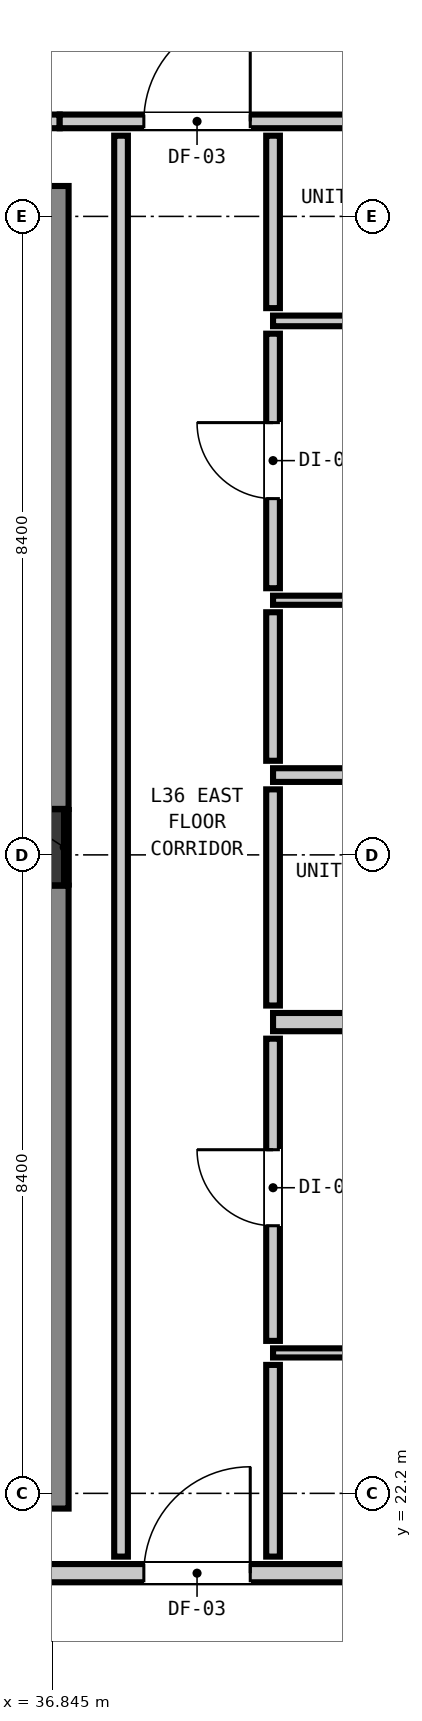
"""IFC4 building model, lengths in metres.
Left out: names, types, materials, properties, quantities, classifications, styles, units other than length and angle.
Written with IfcOpenShell. Run it as: python <this file> out.ifc"""

import sys

from ifc_helpers import new_model, si_unit, direction, frame, frame_2d, origin, origin_2d, place, context, subcontext, project, spatial, rectangle, extrude, element, fill, save


model = new_model("IFC4")
c1 = context("Model", 3, precision=1e-05, world=origin(), true_north=direction((0.0, 1.0)))
c2 = subcontext(c1, "Body", "Model", "MODEL_VIEW")
j1 = project(units=[si_unit("LENGTHUNIT", "METRE"), si_unit("PLANEANGLEUNIT", "RADIAN")], contexts=[c1])
p1 = place(None, origin())
s1 = spatial("IfcSite", under=j1, at=p1, CompositionType="ELEMENT")
p2 = place(p1, origin())
s2 = spatial("IfcBuilding", under=s1, at=p2, CompositionType="ELEMENT")
p3 = place(p2, frame((0.0, 0.0, 126.0)))
s3 = spatial("IfcBuildingStorey", under=s2, at=p3, CompositionType="ELEMENT", Elevation=126.0)
p4 = place(p3, frame((36.5, 30.7, 0.0), z_axis=(0.0, 0.0, 1.0), x_axis=(1.0, 0.0, 0.0)))
e1 = element("IfcColumn", 1, at=p4, inside=s3, PredefinedType="COLUMN", context=c2, shape_type="SweptSolid", body=[
    extrude(rectangle(XDim=1.0, YDim=1.0, at=origin_2d()), origin(), (0.0, 0.0, 1.0), 3.32),
])
p5 = place(p3, frame((36.56, 22.0, 0.0), z_axis=(0.0, 0.0, 1.0), x_axis=(0.0, 1.0, 0.0)))
e2 = element("IfcWall", 2, at=p5, inside=s3, PredefinedType="SHEAR", context=c2, shape_type="SweptSolid", body=[
    extrude(rectangle(XDim=8.195, YDim=1.0, at=frame_2d((4.098, 0.0))), origin(), (0.0, 0.0, 1.0), 3.32),
])
p6 = place(p3, frame((36.56, 31.205, 0.0), z_axis=(0.0, 0.0, 1.0), x_axis=(0.0, 1.0, 0.0)))
e3 = element("IfcWall", 3, at=p6, inside=s3, PredefinedType="SHEAR", context=c2, shape_type="SweptSolid", body=[
    extrude(rectangle(XDim=8.195, YDim=1.0, at=frame_2d((4.097, 0.0))), origin(), (0.0, 0.0, 1.0), 3.32),
])
p7 = place(p3, frame((9.407, 21.15, 0.0), z_axis=(0.0, 0.0, 1.0), x_axis=(1.0, 0.0, 0.0)))
e4 = element("IfcWall", 4, at=p7, inside=s3, PredefinedType="PARTITIONING", context=c2, shape_type="SweptSolid", body=[
    extrude(rectangle(XDim=39.386, YDim=0.24, at=frame_2d((19.693, 0.0))), origin(), (0.0, 0.0, 1.0), 3.08),
])
p8 = place(p7, frame((8.803, 0.0, 0.0)))
e5 = element("IfcOpeningElement", 5, at=p8, cuts=e4, PredefinedType="OPENING", context=c2, shape_type="SweptSolid", body=[
    extrude(rectangle(XDim=1.1, YDim=2.15, at=frame_2d((0.55, 1.075))), frame((0.0, 0.13, 0.0), z_axis=(0.0, -1.0, 0.0), x_axis=(1.0, 0.0, 0.0)), (0.0, 0.0, 1.0), 0.26),
])
p9 = place(p7, frame((1.192, 0.0, 0.0)))
e6 = element("IfcOpeningElement", 6, at=p9, cuts=e4, PredefinedType="OPENING", context=c2, shape_type="SweptSolid", body=[
    extrude(rectangle(XDim=1.4, YDim=2.15, at=frame_2d((0.7, 1.075))), frame((0.0, 0.13, 0.0), z_axis=(0.0, -1.0, 0.0), x_axis=(1.0, 0.0, 0.0)), (0.0, 0.0, 1.0), 0.26),
])
p10 = place(p7, frame((28.643, 0.0, 0.0)))
e7 = element("IfcOpeningElement", 7, at=p10, cuts=e4, PredefinedType="OPENING", context=c2, shape_type="SweptSolid", body=[
    extrude(rectangle(XDim=1.4, YDim=2.15, at=frame_2d((0.7, 1.075))), frame((0.0, 0.13, 0.0), z_axis=(0.0, -1.0, 0.0), x_axis=(1.0, 0.0, 0.0)), (0.0, 0.0, 1.0), 0.26),
])
p11 = place(p3, frame((39.75, 28.4, 0.0), z_axis=(0.0, 0.0, 1.0), x_axis=(1.0, 0.0, 0.0)))
e8 = element("IfcWall", 8, at=p11, inside=s3, PredefinedType="PARTITIONING", context=c2, shape_type="SweptSolid", body=[
    extrude(rectangle(XDim=9.043, YDim=0.24, at=frame_2d((4.521, 0.0))), origin(), (0.0, 0.0, 1.0), 3.08),
])
p12 = place(p11, frame((1.708, 0.0, 0.0)))
e9 = element("IfcOpeningElement", 9, at=p12, cuts=e8, PredefinedType="OPENING", context=c2, shape_type="SweptSolid", body=[
    extrude(rectangle(XDim=0.86, YDim=2.02, at=frame_2d((0.43, 1.01))), frame((0.0, 0.13, 0.0), z_axis=(0.0, -1.0, 0.0), x_axis=(1.0, 0.0, 0.0)), (0.0, 0.0, 1.0), 0.26),
])
p13 = place(p11, frame((6.187, 0.0, 0.0)))
e10 = element("IfcOpeningElement", 10, at=p13, cuts=e8, PredefinedType="OPENING", context=c2, shape_type="SweptSolid", body=[
    extrude(rectangle(XDim=0.9, YDim=2.1, at=frame_2d((0.45, 1.05))), frame((0.0, 0.13, 0.0), z_axis=(0.0, -1.0, 0.0), x_axis=(1.0, 0.0, 0.0)), (0.0, 0.0, 1.0), 0.26),
])
p14 = place(p3, frame((39.75, 31.65, 0.0), z_axis=(0.0, 0.0, 1.0), x_axis=(1.0, 0.0, 0.0)))
e11 = element("IfcWall", 11, at=p14, inside=s3, PredefinedType="PARTITIONING", context=c2, shape_type="SweptSolid", body=[
    extrude(rectangle(XDim=9.043, YDim=0.18, at=frame_2d((4.521, 0.0))), origin(), (0.0, 0.0, 1.0), 3.08),
])
p15 = place(p3, frame((9.407, 40.25, 0.0), z_axis=(0.0, 0.0, 1.0), x_axis=(1.0, 0.0, 0.0)))
e12 = element("IfcWall", 12, at=p15, inside=s3, PredefinedType="PARTITIONING", context=c2, shape_type="SweptSolid", body=[
    extrude(rectangle(XDim=27.536, YDim=0.18, at=frame_2d((13.768, 0.0))), origin(), (0.0, 0.0, 1.0), 3.08),
])
p16 = place(p15, frame((8.028, 0.0, 0.0)))
e13 = element("IfcOpeningElement", 13, at=p16, cuts=e12, PredefinedType="OPENING", context=c2, shape_type="SweptSolid", body=[
    extrude(rectangle(XDim=1.4, YDim=2.15, at=frame_2d((0.7, 1.075))), frame((0.0, 0.1, 0.0), z_axis=(0.0, -1.0, 0.0), x_axis=(1.0, 0.0, 0.0)), (0.0, 0.0, 1.0), 0.2),
])
p17 = place(p15, frame((1.192, 0.0, 0.0)))
e14 = element("IfcOpeningElement", 14, at=p17, cuts=e12, PredefinedType="OPENING", context=c2, shape_type="SweptSolid", body=[
    extrude(rectangle(XDim=1.4, YDim=2.15, at=frame_2d((0.7, 1.075))), frame((0.0, 0.1, 0.0), z_axis=(0.0, -1.0, 0.0), x_axis=(1.0, 0.0, 0.0)), (0.0, 0.0, 1.0), 0.2),
])
p18 = place(p3, frame((36.943, 40.25, 0.0), z_axis=(0.0, 0.0, 1.0), x_axis=(1.0, 0.0, 0.0)))
e15 = element("IfcWall", 15, at=p18, inside=s3, PredefinedType="PARTITIONING", context=c2, shape_type="SweptSolid", body=[
    extrude(rectangle(XDim=10.964, YDim=0.18, at=frame_2d((5.482, 0.0))), origin(), (0.0, 0.0, 1.0), 2.565),
])
p19 = place(p18, frame((1.107, 0.0, 0.0)))
e16 = element("IfcOpeningElement", 16, at=p19, cuts=e15, PredefinedType="OPENING", context=c2, shape_type="SweptSolid", body=[
    extrude(rectangle(XDim=1.4, YDim=2.15, at=frame_2d((0.7, 1.075))), frame((0.0, 0.1, 0.0), z_axis=(0.0, -1.0, 0.0), x_axis=(1.0, 0.0, 0.0)), (0.0, 0.0, 1.0), 0.2),
])
p20 = place(p3, frame((39.75, 37.625, 0.0), z_axis=(0.0, 0.0, 1.0), x_axis=(1.0, 0.0, 0.0)))
e17 = element("IfcWall", 17, at=p20, inside=s3, PredefinedType="PARTITIONING", context=c2, shape_type="SweptSolid", body=[
    extrude(rectangle(XDim=9.043, YDim=0.14, at=frame_2d((4.521, 0.0))), origin(), (0.0, 0.0, 1.0), 3.08),
])
p21 = place(p20, frame((1.708, 0.0, 0.0)))
e18 = element("IfcOpeningElement", 18, at=p21, cuts=e17, PredefinedType="OPENING", context=c2, shape_type="SweptSolid", body=[
    extrude(rectangle(XDim=0.86, YDim=2.02, at=frame_2d((0.43, 1.01))), frame((0.0, 0.08, 0.0), z_axis=(0.0, -1.0, 0.0), x_axis=(1.0, 0.0, 0.0)), (0.0, 0.0, 1.0), 0.16),
])
p22 = place(p20, frame((6.187, 0.0, 0.0)))
e19 = element("IfcOpeningElement", 19, at=p22, cuts=e17, PredefinedType="OPENING", context=c2, shape_type="SweptSolid", body=[
    extrude(rectangle(XDim=0.9, YDim=2.1, at=frame_2d((0.45, 1.05))), frame((0.0, 0.08, 0.0), z_axis=(0.0, -1.0, 0.0), x_axis=(1.0, 0.0, 0.0)), (0.0, 0.0, 1.0), 0.16),
])
p23 = place(p3, frame((39.75, 24.048, 0.0), z_axis=(0.0, 0.0, 1.0), x_axis=(1.0, 0.0, 0.0)))
e20 = element("IfcWall", 20, at=p23, inside=s3, PredefinedType="PARTITIONING", context=c2, shape_type="SweptSolid", body=[
    extrude(rectangle(XDim=9.043, YDim=0.12, at=frame_2d((4.521, 0.0))), origin(), (0.0, 0.0, 1.0), 3.08),
])
p24 = place(p23, frame((4.075, 0.0, 0.0)))
e21 = element("IfcOpeningElement", 21, at=p24, cuts=e20, PredefinedType="OPENING", context=c2, shape_type="SweptSolid", body=[
    extrude(rectangle(XDim=0.9, YDim=2.1, at=frame_2d((0.45, 1.05))), frame((0.0, 0.07, 0.0), z_axis=(0.0, -1.0, 0.0), x_axis=(1.0, 0.0, 0.0)), (0.0, 0.0, 1.0), 0.14),
])
p25 = place(p3, frame((39.75, 33.95, 0.0), z_axis=(0.0, 0.0, 1.0), x_axis=(1.0, 0.0, 0.0)))
e22 = element("IfcWall", 22, at=p25, inside=s3, PredefinedType="PARTITIONING", context=c2, shape_type="SweptSolid", body=[
    extrude(rectangle(XDim=9.043, YDim=0.12, at=frame_2d((4.521, 0.0))), origin(), (0.0, 0.0, 1.0), 3.08),
])
p26 = place(p25, frame((4.075, 0.0, 0.0)))
e23 = element("IfcOpeningElement", 23, at=p26, cuts=e22, PredefinedType="OPENING", context=c2, shape_type="SweptSolid", body=[
    extrude(rectangle(XDim=0.9, YDim=2.1, at=frame_2d((0.45, 1.05))), frame((0.0, 0.07, 0.0), z_axis=(0.0, -1.0, 0.0), x_axis=(1.0, 0.0, 0.0)), (0.0, 0.0, 1.0), 0.14),
])
p27 = place(p3, frame((37.75, 21.368, 0.0), z_axis=(0.0, 0.0, 1.0), x_axis=(0.0, 1.0, 0.0)))
e24 = element("IfcWall", 24, at=p27, inside=s3, PredefinedType="PARTITIONING", context=c2, shape_type="SweptSolid", body=[
    extrude(rectangle(XDim=18.694, YDim=0.18, at=frame_2d((9.347, 0.0))), origin(), (0.0, 0.0, 1.0), 3.08),
])
p28 = place(p3, frame((39.75, 21.368, 0.0), z_axis=(0.0, 0.0, 1.0), x_axis=(0.0, 1.0, 0.0)))
e25 = element("IfcWall", 25, at=p28, inside=s3, PredefinedType="PARTITIONING", context=c2, shape_type="SweptSolid", body=[
    extrude(rectangle(XDim=2.522, YDim=0.18, at=frame_2d((1.261, 0.0))), origin(), (0.0, 0.0, 1.0), 3.08),
])
p29 = place(p3, frame((39.75, 24.206, 0.0), z_axis=(0.0, 0.0, 1.0), x_axis=(0.0, 1.0, 0.0)))
e26 = element("IfcWall", 26, at=p29, inside=s3, PredefinedType="PARTITIONING", context=c2, shape_type="SweptSolid", body=[
    extrude(rectangle(XDim=3.976, YDim=0.18, at=frame_2d((1.988, 0.0))), origin(), (0.0, 0.0, 1.0), 3.08),
])
p30 = place(p29, frame((1.515, 0.0, 0.0)))
e27 = element("IfcOpeningElement", 27, at=p30, cuts=e26, PredefinedType="OPENING", context=c2, shape_type="SweptSolid", body=[
    extrude(rectangle(XDim=1.0, YDim=2.15, at=frame_2d((0.5, 1.075))), frame((0.0, 0.1, 0.0), z_axis=(0.0, -1.0, 0.0), x_axis=(1.0, 0.0, 0.0)), (0.0, 0.0, 1.0), 0.2),
])
p31 = place(p3, frame((39.75, 28.618, 0.0), z_axis=(0.0, 0.0, 1.0), x_axis=(0.0, 1.0, 0.0)))
e28 = element("IfcWall", 28, at=p31, inside=s3, PredefinedType="PARTITIONING", context=c2, shape_type="SweptSolid", body=[
    extrude(rectangle(XDim=2.844, YDim=0.18, at=frame_2d((1.422, 0.0))), origin(), (0.0, 0.0, 1.0), 3.08),
])
p32 = place(p3, frame((39.75, 31.838, 0.0), z_axis=(0.0, 0.0, 1.0), x_axis=(0.0, 1.0, 0.0)))
e29 = element("IfcWall", 29, at=p32, inside=s3, PredefinedType="PARTITIONING", context=c2, shape_type="SweptSolid", body=[
    extrude(rectangle(XDim=1.954, YDim=0.18, at=frame_2d((0.977, 0.0))), origin(), (0.0, 0.0, 1.0), 3.08),
])
p33 = place(p3, frame((39.75, 34.108, 0.0), z_axis=(0.0, 0.0, 1.0), x_axis=(0.0, 1.0, 0.0)))
e30 = element("IfcWall", 30, at=p33, inside=s3, PredefinedType="PARTITIONING", context=c2, shape_type="SweptSolid", body=[
    extrude(rectangle(XDim=3.349, YDim=0.18, at=frame_2d((1.675, 0.0))), origin(), (0.0, 0.0, 1.0), 3.08),
])
p34 = place(p33, frame((1.179, 0.0, 0.0)))
e31 = element("IfcOpeningElement", 31, at=p34, cuts=e30, PredefinedType="OPENING", context=c2, shape_type="SweptSolid", body=[
    extrude(rectangle(XDim=1.0, YDim=2.15, at=frame_2d((0.5, 1.075))), frame((0.0, 0.1, 0.0), z_axis=(0.0, -1.0, 0.0), x_axis=(1.0, 0.0, 0.0)), (0.0, 0.0, 1.0), 0.2),
])
p35 = place(p3, frame((39.75, 37.793, 0.0), z_axis=(0.0, 0.0, 1.0), x_axis=(0.0, 1.0, 0.0)))
e32 = element("IfcWall", 32, at=p35, inside=s3, PredefinedType="PARTITIONING", context=c2, shape_type="SweptSolid", body=[
    extrude(rectangle(XDim=2.269, YDim=0.18, at=frame_2d((1.135, 0.0))), origin(), (0.0, 0.0, 1.0), 3.08),
])
p36 = place(p3, frame((37.032, 30.21, 0.0), z_axis=(0.0, 0.0, 1.0), x_axis=(0.0, 1.0, 0.0)))
e33 = element("IfcWall", 33, at=p36, inside=s3, PredefinedType="PARTITIONING", context=c2, shape_type="SweptSolid", body=[
    extrude(rectangle(XDim=0.98, YDim=0.06, at=frame_2d((0.49, 0.0))), origin(), (0.0, 0.0, 1.0), 1.45),
])
p37 = place(p10, origin())
e34 = element("IfcDoor", 34, at=p37, inside=s3, OperationType="SINGLE_SWING_RIGHT", PredefinedType="DOOR", context=c2, shape_type="SweptSolid", body=[
    extrude(rectangle(XDim=1.4, YDim=2.15, at=frame_2d((0.7, 1.075))), frame((0.0, 0.025, 0.0), z_axis=(0.0, -1.0, 0.0), x_axis=(1.0, 0.0, 0.0)), (0.0, 0.0, 1.0), 0.05),
])
fill(e7, e34)
p38 = place(p19, origin())
e35 = element("IfcDoor", 35, at=p38, inside=s3, OperationType="SINGLE_SWING_RIGHT", PredefinedType="DOOR", context=c2, shape_type="SweptSolid", body=[
    extrude(rectangle(XDim=1.4, YDim=2.15, at=frame_2d((0.7, 1.075))), frame((0.0, 0.025, 0.0), z_axis=(0.0, -1.0, 0.0), x_axis=(1.0, 0.0, 0.0)), (0.0, 0.0, 1.0), 0.05),
])
fill(e16, e35)
p39 = place(p30, origin())
e36 = element("IfcDoor", 36, at=p39, inside=s3, OperationType="SINGLE_SWING_RIGHT", PredefinedType="DOOR", context=c2, shape_type="SweptSolid", body=[
    extrude(rectangle(XDim=1.0, YDim=2.15, at=frame_2d((0.5, 1.075))), frame((0.0, 0.025, 0.0), z_axis=(0.0, -1.0, 0.0), x_axis=(1.0, 0.0, 0.0)), (0.0, 0.0, 1.0), 0.05),
])
fill(e27, e36)
p40 = place(p34, origin())
e37 = element("IfcDoor", 37, at=p40, inside=s3, OperationType="SINGLE_SWING_RIGHT", PredefinedType="DOOR", context=c2, shape_type="SweptSolid", body=[
    extrude(rectangle(XDim=1.0, YDim=2.15, at=frame_2d((0.5, 1.075))), frame((0.0, 0.025, 0.0), z_axis=(0.0, -1.0, 0.0), x_axis=(1.0, 0.0, 0.0)), (0.0, 0.0, 1.0), 0.05),
])
fill(e31, e37)
save(model, sys.argv[1])
